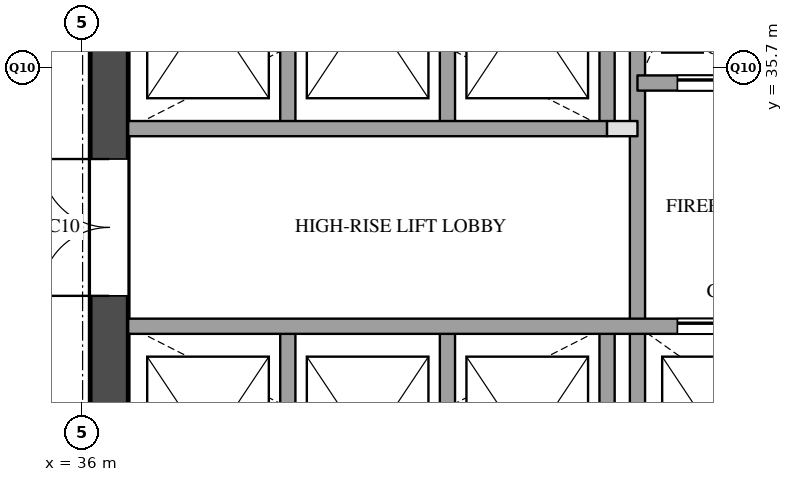
"""IFC4 building model, lengths in metres.
Left out: names, types, materials, properties, quantities, classifications, styles, units other than length and angle.
Written with IfcOpenShell. Run it as: python <this file> out.ifc"""

import sys

from ifc_helpers import new_model, si_unit, direction, frame, frame_2d, origin, place, context, subcontext, project, spatial, rectangle, extrude, element, fill, save


model = new_model("IFC4")
c1 = context("Model", 3, precision=1e-05, world=origin(), true_north=direction((0.0, 1.0)))
c2 = subcontext(c1, "Body", "Model", "MODEL_VIEW")
j1 = project(units=[si_unit("LENGTHUNIT", "METRE"), si_unit("PLANEANGLEUNIT", "RADIAN")], contexts=[c1])
p1 = place(None, origin())
s1 = spatial("IfcSite", under=j1, at=p1, CompositionType="ELEMENT")
p2 = place(p1, origin())
s2 = spatial("IfcBuilding", under=s1, at=p2, CompositionType="ELEMENT")
p3 = place(p2, frame((0.0, 0.0, 142.7)))
s3 = spatial("IfcBuildingStorey", under=s2, at=p3, CompositionType="ELEMENT", Elevation=142.7)
p4 = place(p3, frame((36.35, 29.1, 0.0), z_axis=(0.0, 0.0, 1.0), x_axis=(0.0, 1.0, 0.0)))
e1 = element("IfcWall", 1, at=p4, inside=s3, PredefinedType="SHEAR", context=c2, shape_type="SweptSolid", body=[
    extrude(rectangle(XDim=20.3, YDim=0.5, at=frame_2d((10.15, 0.0))), origin(), (0.0, 0.0, 1.0), 3.6),
])
p5 = place(p4, frame((3.6, 0.0, 0.0)))
e2 = element("IfcOpeningElement", 2, at=p5, cuts=e1, PredefinedType="OPENING", context=c2, shape_type="SweptSolid", body=[
    extrude(rectangle(XDim=1.8, YDim=2.1, at=frame_2d((0.9, 1.05))), frame((0.0, 0.26, 0.0), z_axis=(0.0, -1.0, 0.0), x_axis=(1.0, 0.0, 0.0)), (0.0, 0.0, 1.0), 0.52),
])
p6 = place(p4, frame((16.4, 0.0, 0.0)))
e3 = element("IfcOpeningElement", 3, at=p6, cuts=e1, PredefinedType="OPENING", context=c2, shape_type="SweptSolid", body=[
    extrude(rectangle(XDim=1.0, YDim=2.1, at=frame_2d((0.5, 1.05))), frame((0.0, 0.26, 0.0), z_axis=(0.0, -1.0, 0.0), x_axis=(1.0, 0.0, 0.0)), (0.0, 0.0, 1.0), 0.52),
])
p7 = place(p3, frame((38.7, 29.1, 0.0), z_axis=(0.0, 0.0, 1.0), x_axis=(0.0, 1.0, 0.0)))
e4 = element("IfcWall", 4, at=p7, inside=s3, PredefinedType="SOLIDWALL", context=c2, shape_type="SweptSolid", body=[
    extrude(rectangle(XDim=3.2, YDim=0.2, at=frame_2d((1.6, 0.0))), origin(), (0.0, 0.0, 1.0), 3.6),
])
p8 = place(p3, frame((38.7, 34.9, 0.0), z_axis=(0.0, 0.0, 1.0), x_axis=(0.0, 1.0, 0.0)))
e5 = element("IfcWall", 5, at=p8, inside=s3, PredefinedType="SOLIDWALL", context=c2, shape_type="SweptSolid", body=[
    extrude(rectangle(XDim=3.2, YDim=0.2, at=frame_2d((1.6, 0.0))), origin(), (0.0, 0.0, 1.0), 3.6),
])
p9 = place(p3, frame((40.8, 29.1, 0.0), z_axis=(0.0, 0.0, 1.0), x_axis=(0.0, 1.0, 0.0)))
e6 = element("IfcWall", 6, at=p9, inside=s3, PredefinedType="SOLIDWALL", context=c2, shape_type="SweptSolid", body=[
    extrude(rectangle(XDim=3.2, YDim=0.2, at=frame_2d((1.6, 0.0))), origin(), (0.0, 0.0, 1.0), 3.6),
])
p10 = place(p3, frame((40.8, 34.9, 0.0), z_axis=(0.0, 0.0, 1.0), x_axis=(0.0, 1.0, 0.0)))
e7 = element("IfcWall", 7, at=p10, inside=s3, PredefinedType="SOLIDWALL", context=c2, shape_type="SweptSolid", body=[
    extrude(rectangle(XDim=3.2, YDim=0.2, at=frame_2d((1.6, 0.0))), origin(), (0.0, 0.0, 1.0), 3.6),
])
p11 = place(p3, frame((42.9, 29.1, 0.0), z_axis=(0.0, 0.0, 1.0), x_axis=(0.0, 1.0, 0.0)))
e8 = element("IfcWall", 8, at=p11, inside=s3, PredefinedType="SOLIDWALL", context=c2, shape_type="SweptSolid", body=[
    extrude(rectangle(XDim=3.2, YDim=0.2, at=frame_2d((1.6, 0.0))), origin(), (0.0, 0.0, 1.0), 3.6),
])
p12 = place(p3, frame((42.9, 34.9, 0.0), z_axis=(0.0, 0.0, 1.0), x_axis=(0.0, 1.0, 0.0)))
e9 = element("IfcWall", 9, at=p12, inside=s3, PredefinedType="SOLIDWALL", context=c2, shape_type="SweptSolid", body=[
    extrude(rectangle(XDim=3.2, YDim=0.2, at=frame_2d((1.6, 0.0))), origin(), (0.0, 0.0, 1.0), 3.6),
])
p13 = place(p3, frame((43.3, 29.1, 0.0), z_axis=(0.0, 0.0, 1.0), x_axis=(0.0, 1.0, 0.0)))
e10 = element("IfcWall", 10, at=p13, inside=s3, PredefinedType="SOLIDWALL", context=c2, shape_type="SweptSolid", body=[
    extrude(rectangle(XDim=9.9, YDim=0.2, at=frame_2d((4.95, 0.0))), origin(), (0.0, 0.0, 1.0), 3.6),
])
p14 = place(p3, frame((36.6, 32.3, 0.0), z_axis=(0.0, 0.0, 1.0), x_axis=(1.0, 0.0, 0.0)))
e11 = element("IfcWall", 11, at=p14, inside=s3, PredefinedType="SOLIDWALL", context=c2, shape_type="SweptSolid", body=[
    extrude(rectangle(XDim=11.2, YDim=0.2, at=frame_2d((5.6, 0.0))), origin(), (0.0, 0.0, 1.0), 3.6),
])
p15 = place(p14, frame((7.225, 0.0, 0.0)))
e12 = element("IfcOpeningElement", 12, at=p15, cuts=e11, PredefinedType="OPENING", context=c2, shape_type="SweptSolid", body=[
    extrude(rectangle(XDim=1.2, YDim=2.1, at=frame_2d((0.6, 1.05))), frame((0.0, 0.11, 0.0), z_axis=(0.0, -1.0, 0.0), x_axis=(1.0, 0.0, 0.0)), (0.0, 0.0, 1.0), 0.22),
])
p16 = place(p14, frame((9.475, 0.0, 0.0)))
e13 = element("IfcOpeningElement", 13, at=p16, cuts=e11, PredefinedType="OPENING", context=c2, shape_type="SweptSolid", body=[
    extrude(rectangle(XDim=1.2, YDim=2.1, at=frame_2d((0.6, 1.05))), frame((0.0, 0.11, 0.0), z_axis=(0.0, -1.0, 0.0), x_axis=(1.0, 0.0, 0.0)), (0.0, 0.0, 1.0), 0.22),
])
p17 = place(p3, frame((42.9, 34.9, 0.0), z_axis=(0.0, 0.0, 1.0), x_axis=(1.0, 0.0, 0.0)))
e14 = element("IfcWall", 14, at=p17, inside=s3, PredefinedType="PARTITIONING", context=c2, shape_type="SweptSolid", body=[
    extrude(rectangle(XDim=0.4, YDim=0.2, at=frame_2d((0.2, 0.0))), origin(), (0.0, 0.0, 1.0), 3.6),
])
p18 = place(p3, frame((36.6, 34.9, 0.0), z_axis=(0.0, 0.0, 1.0), x_axis=(1.0, 0.0, 0.0)))
e15 = element("IfcWall", 15, at=p18, inside=s3, PredefinedType="SOLIDWALL", context=c2, shape_type="SweptSolid", body=[
    extrude(rectangle(XDim=6.3, YDim=0.2, at=frame_2d((3.15, 0.0))), origin(), (0.0, 0.0, 1.0), 3.6),
])
p19 = place(p3, frame((43.3, 35.5, 0.0), z_axis=(0.0, 0.0, 1.0), x_axis=(1.0, 0.0, 0.0)))
e16 = element("IfcWall", 16, at=p19, inside=s3, PredefinedType="SOLIDWALL", context=c2, shape_type="SweptSolid", body=[
    extrude(rectangle(XDim=4.5, YDim=0.2, at=frame_2d((2.25, 0.0))), origin(), (0.0, 0.0, 1.0), 3.6),
])
p20 = place(p19, frame((0.525, 0.0, 0.0)))
e17 = element("IfcOpeningElement", 17, at=p20, cuts=e16, PredefinedType="OPENING", context=c2, shape_type="SweptSolid", body=[
    extrude(rectangle(XDim=1.2, YDim=2.1, at=frame_2d((0.6, 1.05))), frame((0.0, 0.11, 0.0), z_axis=(0.0, -1.0, 0.0), x_axis=(1.0, 0.0, 0.0)), (0.0, 0.0, 1.0), 0.22),
])
p21 = place(p19, frame((3.025, 0.0, 0.0)))
e18 = element("IfcOpeningElement", 18, at=p21, cuts=e16, PredefinedType="OPENING", context=c2, shape_type="SweptSolid", body=[
    extrude(rectangle(XDim=0.7, YDim=2.1, at=frame_2d((0.35, 1.05))), frame((0.0, 0.11, 0.0), z_axis=(0.0, -1.0, 0.0), x_axis=(1.0, 0.0, 0.0)), (0.0, 0.0, 1.0), 0.22),
])
p22 = place(p15, origin())
e19 = element("IfcDoor", 19, at=p22, inside=s3, OperationType="SLIDING_TO_LEFT", PredefinedType="DOOR", context=c2, shape_type="SweptSolid", body=[
    extrude(rectangle(XDim=1.2, YDim=2.1, at=frame_2d((0.6, 1.05))), frame((0.0, 0.025, 0.0), z_axis=(0.0, -1.0, 0.0), x_axis=(1.0, 0.0, 0.0)), (0.0, 0.0, 1.0), 0.05),
])
fill(e12, e19)
p23 = place(p20, origin())
e20 = element("IfcDoor", 20, at=p23, inside=s3, OperationType="SLIDING_TO_LEFT", PredefinedType="DOOR", context=c2, shape_type="SweptSolid", body=[
    extrude(rectangle(XDim=1.2, YDim=2.1, at=frame_2d((0.6, 1.05))), frame((0.0, 0.025, 0.0), z_axis=(0.0, -1.0, 0.0), x_axis=(1.0, 0.0, 0.0)), (0.0, 0.0, 1.0), 0.05),
])
fill(e17, e20)
p24 = place(p5, origin())
e21 = element("IfcDoor", 21, at=p24, inside=s3, OperationType="DOUBLE_DOOR_SINGLE_SWING", PredefinedType="DOOR", context=c2, shape_type="SweptSolid", body=[
    extrude(rectangle(XDim=1.8, YDim=2.1, at=frame_2d((0.9, 1.05))), frame((0.0, 0.025, 0.0), z_axis=(0.0, -1.0, 0.0), x_axis=(1.0, 0.0, 0.0)), (0.0, 0.0, 1.0), 0.05),
])
fill(e2, e21)
save(model, sys.argv[1])
